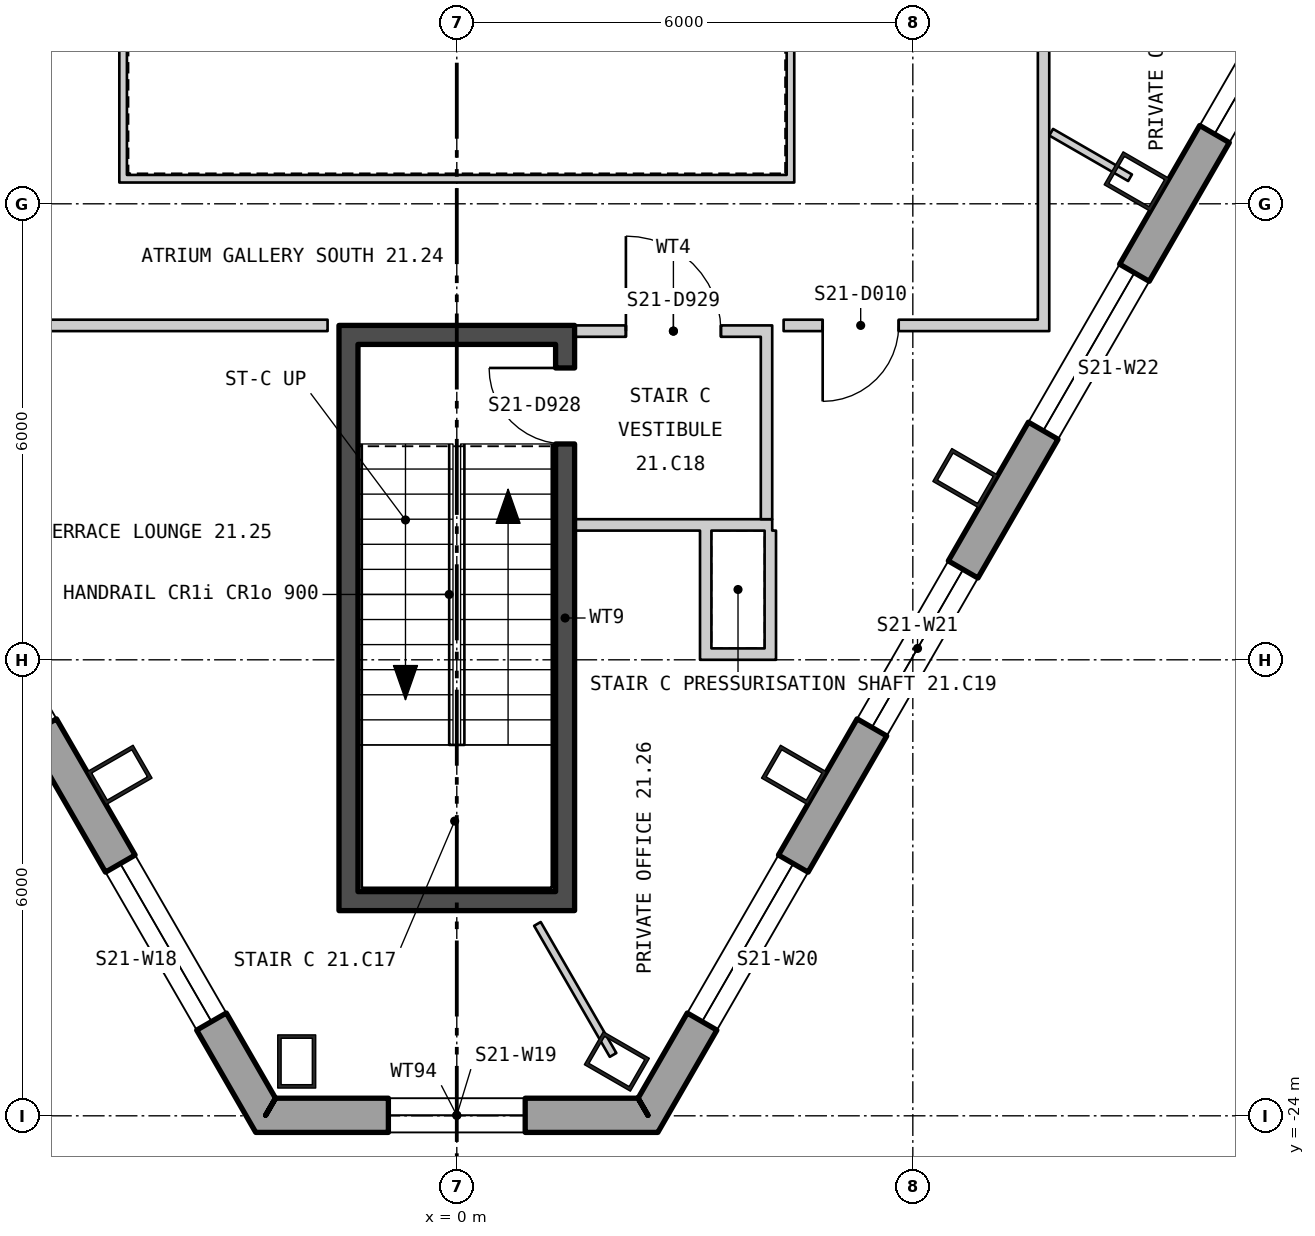
"""IFC4 building model, lengths in metres.
Left out: names, types, materials, properties, quantities, classifications, styles, units other than length and angle.
Written with IfcOpenShell. Run it as: python <this file> out.ifc"""

import sys

from ifc_helpers import new_model, si_unit, direction, frame, frame_2d, origin, origin_2d, place, context, subcontext, project, spatial, polyline, rectangle, hollow_rectangle, outline, extrude, element, fill, save


model = new_model("IFC4")
c1 = context("Model", 3, precision=1e-05, world=origin(), true_north=direction((0.0, 1.0)))
c2 = subcontext(c1, "Body", "Model", "MODEL_VIEW")
j1 = project(units=[si_unit("LENGTHUNIT", "METRE"), si_unit("PLANEANGLEUNIT", "RADIAN")], contexts=[c1])
p1 = place(None, origin())
s1 = spatial("IfcSite", under=j1, at=p1, CompositionType="ELEMENT")
p2 = place(p1, origin())
s2 = spatial("IfcBuilding", under=s1, at=p2, CompositionType="ELEMENT")
p3 = place(p2, frame((0.0, 0.0, 280.5)))
s3 = spatial("IfcBuildingStorey", under=s2, at=p3, CompositionType="ELEMENT", Elevation=280.5)
for number, where, z_axis, x_axis in (
    (1, (-4.437, -19.515, 0.0), (0.0, 0.0, 1.0), (0.5, -0.866, 0.0)),
    (2, (-2.106, -23.285, 0.0), (0.0, 0.0, 1.0), (1.0, 0.0, 0.0)),
    (3, (2.106, -23.285, 0.0), (0.0, 0.0, 1.0), (0.5, 0.866, 0.0)),
    (4, (4.437, -19.515, 0.0), (0.0, 0.0, 1.0), (0.5, 0.866, 0.0)),
    (5, (6.691, -15.611, 0.0), (0.0, 0.0, 1.0), (0.5, 0.866, 0.0)),
    (6, (8.945, -11.707, 0.0), (0.0, 0.0, 1.0), (0.5, 0.866, 0.0)),
):
    element("IfcColumn", number, at=place(p3, frame(where, z_axis=z_axis, x_axis=x_axis)), inside=s3, PredefinedType="COLUMN", context=c2, shape_type="SweptSolid", body=[
        extrude(hollow_rectangle(XDim=0.5, YDim=0.7, WallThickness=0.045, at=origin_2d()), origin(), (0.0, 0.0, 1.0), 3.9),
    ])
p4 = place(p3, frame((-25.385, 15.619, -0.18), z_axis=(0.0, 0.0, 1.0), x_axis=(0.500000711659, -0.866024992908, 0.0)))
e7 = element("IfcWall", 7, at=p4, inside=s3, PredefinedType="SOLIDWALL", context=c2, shape_type="SweptSolid", body=[
    extrude(outline(polyline([(-0.13, -0.225), (45.87, -0.225), (45.61, 0.225), (0.13, 0.225), (-0.13, -0.225)])), origin(), (0.0, 0.0, 1.0), 3.68),
])
p5 = place(p4, frame((1.424, 0.0, 1.08)))
e8 = element("IfcOpeningElement", 8, at=p5, cuts=e7, PredefinedType="OPENING", context=c2, shape_type="SweptSolid", body=[
    extrude(rectangle(XDim=2.4, YDim=2.0, at=frame_2d((1.2, 1.0))), frame((0.0, 0.235, 0.0), z_axis=(0.0, -1.0, 0.0), x_axis=(1.0, 0.0, 0.0)), (0.0, 0.0, 1.0), 0.47),
])
p6 = place(p4, frame((5.893, 0.0, 1.08)))
e9 = element("IfcOpeningElement", 9, at=p6, cuts=e7, PredefinedType="OPENING", context=c2, shape_type="SweptSolid", body=[
    extrude(rectangle(XDim=2.4, YDim=2.0, at=frame_2d((1.2, 1.0))), frame((0.0, 0.235, 0.0), z_axis=(0.0, -1.0, 0.0), x_axis=(1.0, 0.0, 0.0)), (0.0, 0.0, 1.0), 0.47),
])
p7 = place(p4, frame((10.401, 0.0, 1.08)))
e10 = element("IfcOpeningElement", 10, at=p7, cuts=e7, PredefinedType="OPENING", context=c2, shape_type="SweptSolid", body=[
    extrude(rectangle(XDim=2.4, YDim=2.0, at=frame_2d((1.2, 1.0))), frame((0.0, 0.235, 0.0), z_axis=(0.0, -1.0, 0.0), x_axis=(1.0, 0.0, 0.0)), (0.0, 0.0, 1.0), 0.47),
])
p8 = place(p4, frame((14.909, 0.0, 1.08)))
e11 = element("IfcOpeningElement", 11, at=p8, cuts=e7, PredefinedType="OPENING", context=c2, shape_type="SweptSolid", body=[
    extrude(rectangle(XDim=2.4, YDim=2.0, at=frame_2d((1.2, 1.0))), frame((0.0, 0.235, 0.0), z_axis=(0.0, -1.0, 0.0), x_axis=(1.0, 0.0, 0.0)), (0.0, 0.0, 1.0), 0.47),
])
p9 = place(p4, frame((19.416, 0.0, 1.08)))
e12 = element("IfcOpeningElement", 12, at=p9, cuts=e7, PredefinedType="OPENING", context=c2, shape_type="SweptSolid", body=[
    extrude(rectangle(XDim=2.4, YDim=2.0, at=frame_2d((1.2, 1.0))), frame((0.0, 0.235, 0.0), z_axis=(0.0, -1.0, 0.0), x_axis=(1.0, 0.0, 0.0)), (0.0, 0.0, 1.0), 0.47),
])
p10 = place(p4, frame((23.924, 0.0, 1.08)))
e13 = element("IfcOpeningElement", 13, at=p10, cuts=e7, PredefinedType="OPENING", context=c2, shape_type="SweptSolid", body=[
    extrude(rectangle(XDim=2.4, YDim=2.0, at=frame_2d((1.2, 1.0))), frame((0.0, 0.235, 0.0), z_axis=(0.0, -1.0, 0.0), x_axis=(1.0, 0.0, 0.0)), (0.0, 0.0, 1.0), 0.47),
])
p11 = place(p4, frame((28.431, 0.0, 1.08)))
e14 = element("IfcOpeningElement", 14, at=p11, cuts=e7, PredefinedType="OPENING", context=c2, shape_type="SweptSolid", body=[
    extrude(rectangle(XDim=2.4, YDim=2.0, at=frame_2d((1.2, 1.0))), frame((0.0, 0.235, 0.0), z_axis=(0.0, -1.0, 0.0), x_axis=(1.0, 0.0, 0.0)), (0.0, 0.0, 1.0), 0.47),
])
p12 = place(p4, frame((32.939, 0.0, 1.08)))
e15 = element("IfcOpeningElement", 15, at=p12, cuts=e7, PredefinedType="OPENING", context=c2, shape_type="SweptSolid", body=[
    extrude(rectangle(XDim=2.4, YDim=2.0, at=frame_2d((1.2, 1.0))), frame((0.0, 0.235, 0.0), z_axis=(0.0, -1.0, 0.0), x_axis=(1.0, 0.0, 0.0)), (0.0, 0.0, 1.0), 0.47),
])
p13 = place(p4, frame((37.447, 0.0, 1.08)))
e16 = element("IfcOpeningElement", 16, at=p13, cuts=e7, PredefinedType="OPENING", context=c2, shape_type="SweptSolid", body=[
    extrude(rectangle(XDim=2.4, YDim=2.0, at=frame_2d((1.2, 1.0))), frame((0.0, 0.235, 0.0), z_axis=(0.0, -1.0, 0.0), x_axis=(1.0, 0.0, 0.0)), (0.0, 0.0, 1.0), 0.47),
])
p14 = place(p4, frame((41.916, 0.0, 1.08)))
e17 = element("IfcOpeningElement", 17, at=p14, cuts=e7, PredefinedType="OPENING", context=c2, shape_type="SweptSolid", body=[
    extrude(rectangle(XDim=2.4, YDim=2.0, at=frame_2d((1.2, 1.0))), frame((0.0, 0.235, 0.0), z_axis=(0.0, -1.0, 0.0), x_axis=(1.0, 0.0, 0.0)), (0.0, 0.0, 1.0), 0.47),
])
p15 = place(p3, frame((-2.515, -23.993, -0.18), z_axis=(0.0, 0.0, 1.0), x_axis=(1.0, 0.0, 0.0)))
e18 = element("IfcWall", 18, at=p15, inside=s3, PredefinedType="SOLIDWALL", context=c2, shape_type="SweptSolid", body=[
    extrude(outline(polyline([(-0.13, -0.225), (5.16, -0.225), (4.9, 0.225), (0.13, 0.225), (-0.13, -0.225)])), origin(), (0.0, 0.0, 1.0), 3.68),
])
p16 = place(p15, frame((1.615, 0.0, 1.08)))
e19 = element("IfcOpeningElement", 19, at=p16, cuts=e18, PredefinedType="OPENING", context=c2, shape_type="SweptSolid", body=[
    extrude(rectangle(XDim=1.8, YDim=2.0, at=frame_2d((0.9, 1.0))), frame((0.0, 0.235, 0.0), z_axis=(0.0, -1.0, 0.0), x_axis=(1.0, 0.0, 0.0)), (0.0, 0.0, 1.0), 0.47),
])
p17 = place(p3, frame((2.515, -23.993, -0.18), z_axis=(0.0, 0.0, 1.0), x_axis=(0.500000711659, 0.866024992908, 0.0)))
e20 = element("IfcWall", 20, at=p17, inside=s3, PredefinedType="SOLIDWALL", context=c2, shape_type="SweptSolid", body=[
    extrude(outline(polyline([(-0.13, -0.225), (45.87, -0.225), (45.61, 0.225), (0.13, 0.225), (-0.13, -0.225)])), origin(), (0.0, 0.0, 1.0), 3.68),
])
p18 = place(p17, frame((1.424, 0.0, 1.08)))
e21 = element("IfcOpeningElement", 21, at=p18, cuts=e20, PredefinedType="OPENING", context=c2, shape_type="SweptSolid", body=[
    extrude(rectangle(XDim=2.4, YDim=2.0, at=frame_2d((1.2, 1.0))), frame((0.0, 0.235, 0.0), z_axis=(0.0, -1.0, 0.0), x_axis=(1.0, 0.0, 0.0)), (0.0, 0.0, 1.0), 0.47),
])
p19 = place(p17, frame((5.893, 0.0, 1.08)))
e22 = element("IfcOpeningElement", 22, at=p19, cuts=e20, PredefinedType="OPENING", context=c2, shape_type="SweptSolid", body=[
    extrude(rectangle(XDim=2.4, YDim=2.0, at=frame_2d((1.2, 1.0))), frame((0.0, 0.235, 0.0), z_axis=(0.0, -1.0, 0.0), x_axis=(1.0, 0.0, 0.0)), (0.0, 0.0, 1.0), 0.47),
])
p20 = place(p17, frame((10.401, 0.0, 1.08)))
e23 = element("IfcOpeningElement", 23, at=p20, cuts=e20, PredefinedType="OPENING", context=c2, shape_type="SweptSolid", body=[
    extrude(rectangle(XDim=2.4, YDim=2.0, at=frame_2d((1.2, 1.0))), frame((0.0, 0.235, 0.0), z_axis=(0.0, -1.0, 0.0), x_axis=(1.0, 0.0, 0.0)), (0.0, 0.0, 1.0), 0.47),
])
p21 = place(p17, frame((14.909, 0.0, 1.08)))
e24 = element("IfcOpeningElement", 24, at=p21, cuts=e20, PredefinedType="OPENING", context=c2, shape_type="SweptSolid", body=[
    extrude(rectangle(XDim=2.4, YDim=2.0, at=frame_2d((1.2, 1.0))), frame((0.0, 0.235, 0.0), z_axis=(0.0, -1.0, 0.0), x_axis=(1.0, 0.0, 0.0)), (0.0, 0.0, 1.0), 0.47),
])
p22 = place(p17, frame((19.416, 0.0, 1.08)))
e25 = element("IfcOpeningElement", 25, at=p22, cuts=e20, PredefinedType="OPENING", context=c2, shape_type="SweptSolid", body=[
    extrude(rectangle(XDim=2.4, YDim=2.0, at=frame_2d((1.2, 1.0))), frame((0.0, 0.235, 0.0), z_axis=(0.0, -1.0, 0.0), x_axis=(1.0, 0.0, 0.0)), (0.0, 0.0, 1.0), 0.47),
])
p23 = place(p17, frame((28.431, 0.0, 1.08)))
e26 = element("IfcOpeningElement", 26, at=p23, cuts=e20, PredefinedType="OPENING", context=c2, shape_type="SweptSolid", body=[
    extrude(rectangle(XDim=2.4, YDim=2.0, at=frame_2d((1.2, 1.0))), frame((0.0, 0.235, 0.0), z_axis=(0.0, -1.0, 0.0), x_axis=(1.0, 0.0, 0.0)), (0.0, 0.0, 1.0), 0.47),
])
p24 = place(p17, frame((37.447, 0.0, 1.08)))
e27 = element("IfcOpeningElement", 27, at=p24, cuts=e20, PredefinedType="OPENING", context=c2, shape_type="SweptSolid", body=[
    extrude(rectangle(XDim=2.4, YDim=2.0, at=frame_2d((1.2, 1.0))), frame((0.0, 0.235, 0.0), z_axis=(0.0, -1.0, 0.0), x_axis=(1.0, 0.0, 0.0)), (0.0, 0.0, 1.0), 0.47),
])
p25 = place(p17, frame((41.916, 0.0, 1.08)))
e28 = element("IfcOpeningElement", 28, at=p25, cuts=e20, PredefinedType="OPENING", context=c2, shape_type="SweptSolid", body=[
    extrude(rectangle(XDim=2.4, YDim=2.0, at=frame_2d((1.2, 1.0))), frame((0.0, 0.235, 0.0), z_axis=(0.0, -1.0, 0.0), x_axis=(1.0, 0.0, 0.0)), (0.0, 0.0, 1.0), 0.47),
])
p26 = place(p3, frame((-4.44, -11.67, 0.0), z_axis=(0.0, 0.0, 1.0), x_axis=(1.0, 0.0, 0.0)))
e29 = element("IfcWall", 29, at=p26, inside=s3, PredefinedType="PARTITIONING", context=c2, shape_type="SweptSolid", body=[
    extrude(rectangle(XDim=8.88, YDim=0.1, at=frame_2d((4.44, 0.0))), origin(), (0.0, 0.0, 1.0), 3.7),
])
for number, where, z_axis, x_axis in (
    (30, (4.39, -11.62, 0.0), (0.0, 0.0, 1.0), (0.0, 1.0, 0.0)),
    (31, (-4.39, -3.58, 0.0), (0.0, 0.0, 1.0), (0.0, -1.0, 0.0)),
):
    element("IfcWall", number, at=place(p3, frame(where, z_axis=z_axis, x_axis=x_axis)), inside=s3, PredefinedType="PARTITIONING", context=c2, shape_type="SweptSolid", body=[
        extrude(rectangle(XDim=8.04, YDim=0.1, at=frame_2d((4.02, 0.0))), origin(), (0.0, 0.0, 1.0), 3.7),
    ])
p27 = place(p3, frame((-1.425, -21.05, 0.0), z_axis=(0.0, 0.0, 1.0), x_axis=(0.0, 1.0, 0.0)))
e32 = element("IfcWall", 32, at=p27, inside=s3, PredefinedType="SHEAR", context=c2, shape_type="SweptSolid", body=[
    extrude(rectangle(XDim=7.2, YDim=0.25, at=frame_2d((3.6, 0.0))), origin(), (0.0, 0.0, 1.0), 3.7),
])
p28 = place(p3, frame((1.425, -21.05, 0.0), z_axis=(0.0, 0.0, 1.0), x_axis=(0.0, 1.0, 0.0)))
e33 = element("IfcWall", 33, at=p28, inside=s3, PredefinedType="SHEAR", context=c2, shape_type="SweptSolid", body=[
    extrude(rectangle(XDim=7.2, YDim=0.25, at=frame_2d((3.6, 0.0))), origin(), (0.0, 0.0, 1.0), 3.7),
])
p29 = place(p28, frame((5.89, 0.0, 0.0)))
e34 = element("IfcOpeningElement", 34, at=p29, cuts=e33, PredefinedType="OPENING", context=c2, shape_type="SweptSolid", body=[
    extrude(rectangle(XDim=1.0, YDim=2.1, at=frame_2d((0.5, 1.05))), frame((0.0, 0.135, 0.0), z_axis=(0.0, -1.0, 0.0), x_axis=(1.0, 0.0, 0.0)), (0.0, 0.0, 1.0), 0.27),
])
for number, where, z_axis, x_axis in (
    (35, (-1.55, -21.175, 0.0), (0.0, 0.0, 1.0), (1.0, 0.0, 0.0)),
    (36, (-1.55, -13.725, 0.0), (0.0, 0.0, 1.0), (1.0, 0.0, 0.0)),
):
    element("IfcWall", number, at=place(p3, frame(where, z_axis=z_axis, x_axis=x_axis)), inside=s3, PredefinedType="SHEAR", context=c2, shape_type="SweptSolid", body=[
        extrude(rectangle(XDim=3.1, YDim=0.25, at=frame_2d((1.55, 0.0))), origin(), (0.0, 0.0, 1.0), 3.7),
    ])
p30 = place(p3, frame((1.55, -16.225, 0.0), z_axis=(0.0, 0.0, 1.0), x_axis=(1.0, 0.0, 0.0)))
e37 = element("IfcWall", 37, at=p30, inside=s3, PredefinedType="PARTITIONING", context=c2, shape_type="SweptSolid", body=[
    extrude(rectangle(XDim=2.6, YDim=0.15, at=frame_2d((1.3, 0.0))), origin(), (0.0, 0.0, 1.0), 3.7),
])
p31 = place(p3, frame((4.075, -16.15, 0.0), z_axis=(0.0, 0.0, 1.0), x_axis=(0.0, 1.0, 0.0)))
e38 = element("IfcWall", 38, at=p31, inside=s3, PredefinedType="PARTITIONING", context=c2, shape_type="SweptSolid", body=[
    extrude(rectangle(XDim=2.4, YDim=0.15, at=frame_2d((1.2, 0.0))), origin(), (0.0, 0.0, 1.0), 3.7),
])
p32 = place(p3, frame((1.55, -13.675, 0.0), z_axis=(0.0, 0.0, 1.0), x_axis=(1.0, 0.0, 0.0)))
e39 = element("IfcWall", 39, at=p32, inside=s3, PredefinedType="PARTITIONING", context=c2, shape_type="SweptSolid", body=[
    extrude(rectangle(XDim=2.6, YDim=0.15, at=frame_2d((1.3, 0.0))), origin(), (0.0, 0.0, 1.0), 2.79),
])
p33 = place(p32, frame((0.675, 0.0, 0.0)))
e40 = element("IfcOpeningElement", 40, at=p33, cuts=e39, PredefinedType="OPENING", context=c2, shape_type="SweptSolid", body=[
    extrude(rectangle(XDim=1.25, YDim=2.1, at=frame_2d((0.625, 1.05))), frame((0.0, 0.085, 0.0), z_axis=(0.0, -1.0, 0.0), x_axis=(1.0, 0.0, 0.0)), (0.0, 0.0, 1.0), 0.17),
])
p34 = place(p3, frame((3.275, -18.0, 0.0), z_axis=(0.0, 0.0, 1.0), x_axis=(0.0, 1.0, 0.0)))
e41 = element("IfcWall", 41, at=p34, inside=s3, PredefinedType="PARTITIONING", context=c2, shape_type="SweptSolid", body=[
    extrude(rectangle(XDim=1.7, YDim=0.15, at=frame_2d((0.85, 0.0))), origin(), (0.0, 0.0, 1.0), 3.2),
])
p35 = place(p3, frame((3.35, -17.925, 0.0), z_axis=(0.0, 0.0, 1.0), x_axis=(1.0, 0.0, 0.0)))
e42 = element("IfcWall", 42, at=p35, inside=s3, PredefinedType="PARTITIONING", context=c2, shape_type="SweptSolid", body=[
    extrude(rectangle(XDim=0.7, YDim=0.15, at=frame_2d((0.35, 0.0))), origin(), (0.0, 0.0, 1.0), 3.7),
])
p36 = place(p3, frame((4.125, -18.0, 0.0), z_axis=(0.0, 0.0, 1.0), x_axis=(0.0, 1.0, 0.0)))
e43 = element("IfcWall", 43, at=p36, inside=s3, PredefinedType="PARTITIONING", context=c2, shape_type="SweptSolid", body=[
    extrude(rectangle(XDim=1.7, YDim=0.15, at=frame_2d((0.85, 0.0))), origin(), (0.0, 0.0, 1.0), 3.7),
])
p37 = place(p3, frame((-7.645, -13.6, 0.0), z_axis=(0.0, 0.0, 1.0), x_axis=(1.0, 0.0, 0.0)))
e44 = element("IfcWall", 44, at=p37, inside=s3, PredefinedType="PARTITIONING", context=c2, shape_type="SweptSolid", body=[
    extrude(rectangle(XDim=5.945, YDim=0.15, at=frame_2d((2.973, 0.0))), origin(), (0.0, 0.0, 1.0), 2.79),
])
p38 = place(p3, frame((1.061, -21.475, 0.0), z_axis=(0.0, 0.0, 1.0), x_axis=(0.499867417214, -0.866101936961, 0.0)))
e45 = element("IfcWall", 45, at=p38, inside=s3, PredefinedType="PARTITIONING", context=c2, shape_type="SweptSolid", body=[
    extrude(rectangle(XDim=1.99, YDim=0.1, at=frame_2d((0.995, 0.0))), origin(), (0.0, 0.0, 1.0), 3.7),
])
p39 = place(p3, frame((4.3, -13.6, 0.0), z_axis=(0.0, 0.0, 1.0), x_axis=(1.0, 0.0, 0.0)))
e46 = element("IfcWall", 46, at=p39, inside=s3, PredefinedType="PARTITIONING", context=c2, shape_type="SweptSolid", body=[
    extrude(rectangle(XDim=3.345, YDim=0.15, at=frame_2d((1.673, 0.0))), origin(), (0.0, 0.0, 1.0), 2.79),
])
p40 = place(p39, frame((0.514, 0.0, 0.0)))
e47 = element("IfcOpeningElement", 47, at=p40, cuts=e46, PredefinedType="OPENING", context=c2, shape_type="SweptSolid", body=[
    extrude(rectangle(XDim=1.0, YDim=2.1, at=frame_2d((0.5, 1.05))), frame((0.0, 0.085, 0.0), z_axis=(0.0, -1.0, 0.0), x_axis=(1.0, 0.0, 0.0)), (0.0, 0.0, 1.0), 0.17),
])
p41 = place(p3, frame((7.72, -13.675, 0.0), z_axis=(0.0, 0.0, 1.0), x_axis=(0.0, 1.0, 0.0)))
e48 = element("IfcWall", 48, at=p41, inside=s3, PredefinedType="PARTITIONING", context=c2, shape_type="SweptSolid", body=[
    extrude(rectangle(XDim=7.892, YDim=0.15, at=frame_2d((3.946, 0.0))), origin(), (0.0, 0.0, 1.0), 3.7),
])
p42 = place(p41, frame((4.777, 0.0, 0.0)))
e49 = element("IfcOpeningElement", 49, at=p42, cuts=e48, PredefinedType="OPENING", context=c2, shape_type="SweptSolid", body=[
    extrude(rectangle(XDim=1.0, YDim=2.1, at=frame_2d((0.5, 1.05))), frame((0.0, 0.085, 0.0), z_axis=(0.0, -1.0, 0.0), x_axis=(1.0, 0.0, 0.0)), (0.0, 0.0, 1.0), 0.17),
])
p43 = place(p3, frame((7.82, -11.058, 0.0), z_axis=(0.0, 0.0, 1.0), x_axis=(0.866130014302, -0.499818765479, 0.0)))
e50 = element("IfcWall", 50, at=p43, inside=s3, PredefinedType="PARTITIONING", context=c2, shape_type="SweptSolid", body=[
    extrude(rectangle(XDim=1.198, YDim=0.1, at=frame_2d((0.599, 0.0))), origin(), (0.0, 0.0, 1.0), 3.7),
])
p44 = place(p14, origin())
e51 = element("IfcWindow", 51, at=p44, inside=s3, PartitioningType="SINGLE_PANEL", PredefinedType="WINDOW", context=c2, shape_type="SweptSolid", body=[
    extrude(rectangle(XDim=2.4, YDim=2.0, at=frame_2d((1.2, 1.0))), frame((0.0, 0.105, 0.0), z_axis=(0.0, -1.0, 0.0), x_axis=(1.0, 0.0, 0.0)), (0.0, 0.0, 1.0), 0.06),
])
fill(e17, e51)
p45 = place(p16, origin())
e52 = element("IfcWindow", 52, at=p45, inside=s3, PartitioningType="SINGLE_PANEL", PredefinedType="WINDOW", context=c2, shape_type="SweptSolid", body=[
    extrude(rectangle(XDim=1.8, YDim=2.0, at=frame_2d((0.9, 1.0))), frame((0.0, 0.105, 0.0), z_axis=(0.0, -1.0, 0.0), x_axis=(1.0, 0.0, 0.0)), (0.0, 0.0, 1.0), 0.06),
])
fill(e19, e52)
p46 = place(p18, origin())
e53 = element("IfcWindow", 53, at=p46, inside=s3, PartitioningType="SINGLE_PANEL", PredefinedType="WINDOW", context=c2, shape_type="SweptSolid", body=[
    extrude(rectangle(XDim=2.4, YDim=2.0, at=frame_2d((1.2, 1.0))), frame((0.0, 0.105, 0.0), z_axis=(0.0, -1.0, 0.0), x_axis=(1.0, 0.0, 0.0)), (0.0, 0.0, 1.0), 0.06),
])
fill(e21, e53)
p47 = place(p19, origin())
e54 = element("IfcWindow", 54, at=p47, inside=s3, PartitioningType="SINGLE_PANEL", PredefinedType="WINDOW", context=c2, shape_type="SweptSolid", body=[
    extrude(rectangle(XDim=2.4, YDim=2.0, at=frame_2d((1.2, 1.0))), frame((0.0, 0.105, 0.0), z_axis=(0.0, -1.0, 0.0), x_axis=(1.0, 0.0, 0.0)), (0.0, 0.0, 1.0), 0.06),
])
fill(e22, e54)
p48 = place(p20, origin())
e55 = element("IfcWindow", 55, at=p48, inside=s3, PartitioningType="SINGLE_PANEL", PredefinedType="WINDOW", context=c2, shape_type="SweptSolid", body=[
    extrude(rectangle(XDim=2.4, YDim=2.0, at=frame_2d((1.2, 1.0))), frame((0.0, 0.105, 0.0), z_axis=(0.0, -1.0, 0.0), x_axis=(1.0, 0.0, 0.0)), (0.0, 0.0, 1.0), 0.06),
])
fill(e23, e55)
p49 = place(p21, origin())
e56 = element("IfcWindow", 56, at=p49, inside=s3, PartitioningType="SINGLE_PANEL", PredefinedType="WINDOW", context=c2, shape_type="SweptSolid", body=[
    extrude(rectangle(XDim=2.4, YDim=2.0, at=frame_2d((1.2, 1.0))), frame((0.0, 0.105, 0.0), z_axis=(0.0, -1.0, 0.0), x_axis=(1.0, 0.0, 0.0)), (0.0, 0.0, 1.0), 0.06),
])
fill(e24, e56)
p50 = place(p29, origin())
e57 = element("IfcDoor", 57, at=p50, inside=s3, OperationType="SINGLE_SWING_LEFT", PredefinedType="DOOR", context=c2, shape_type="SweptSolid", body=[
    extrude(rectangle(XDim=1.0, YDim=2.1, at=frame_2d((0.5, 1.05))), frame((0.0, 0.025, 0.0), z_axis=(0.0, -1.0, 0.0), x_axis=(1.0, 0.0, 0.0)), (0.0, 0.0, 1.0), 0.05),
])
fill(e34, e57)
p51 = place(p33, origin())
e58 = element("IfcDoor", 58, at=p51, inside=s3, OperationType="SINGLE_SWING_RIGHT", PredefinedType="DOOR", context=c2, shape_type="SweptSolid", body=[
    extrude(rectangle(XDim=1.25, YDim=2.1, at=frame_2d((0.625, 1.05))), frame((0.0, 0.025, 0.0), z_axis=(0.0, -1.0, 0.0), x_axis=(1.0, 0.0, 0.0)), (0.0, 0.0, 1.0), 0.05),
])
fill(e40, e58)
p52 = place(p40, origin())
e59 = element("IfcDoor", 59, at=p52, inside=s3, OperationType="SINGLE_SWING_LEFT", PredefinedType="DOOR", context=c2, shape_type="SweptSolid", body=[
    extrude(rectangle(XDim=1.0, YDim=2.1, at=frame_2d((0.5, 1.05))), frame((0.0, 0.025, 0.0), z_axis=(0.0, -1.0, 0.0), x_axis=(1.0, 0.0, 0.0)), (0.0, 0.0, 1.0), 0.05),
])
fill(e47, e59)
save(model, sys.argv[1])
